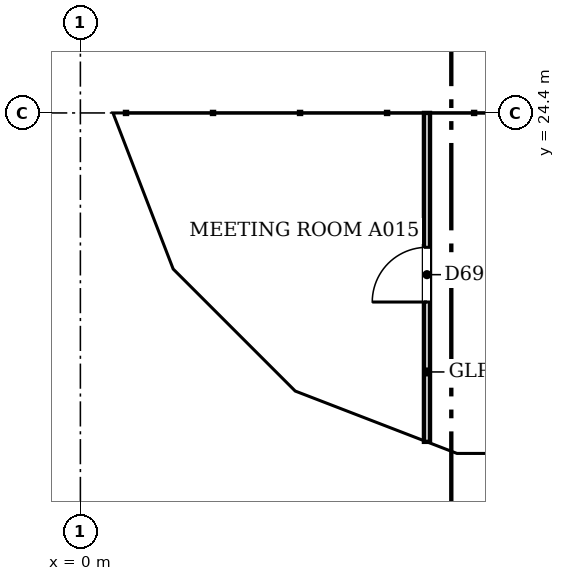
"""IFC4 building model, lengths in metres.
Left out: names, types, materials, properties, quantities, classifications, styles, units other than length and angle.
Written with IfcOpenShell. Run it as: python <this file> out.ifc"""

import sys

from ifc_helpers import new_model, si_unit, direction, frame, frame_2d, origin, place, context, subcontext, project, spatial, polyline, rectangle, outline, extrude, faceted_brep, source, transform, mapped, element, fill, save


model = new_model("IFC4")
c1 = context("Model", 3, precision=1e-05, world=origin(), true_north=direction((0.0, 1.0)))
c2 = subcontext(c1, "Body", "Model", "MODEL_VIEW")
j1 = project(units=[si_unit("LENGTHUNIT", "METRE"), si_unit("PLANEANGLEUNIT", "RADIAN")], contexts=[c1])
p1 = place(None, origin())
s1 = spatial("IfcSite", under=j1, at=p1, CompositionType="ELEMENT")
p2 = place(p1, origin())
s2 = spatial("IfcBuilding", under=s1, at=p2, CompositionType="ELEMENT")
p3 = place(p2, frame((0.0, 0.0, 216.9)))
s3 = spatial("IfcBuildingStorey", under=s2, at=p3, CompositionType="ELEMENT", Elevation=216.9)
m1 = source(origin(), c2, "Body", "Brep", [
    faceted_brep([(3.003, -0.25, 0.0), (3.05, -0.25, 0.06), (3.05, -0.25, 7.54), (3.003, -0.25, 7.6), (0.0, -0.25, 3.8), (0.0, 0.25, 3.8), (2.957, 0.25, 7.541), (2.957, 0.25, 0.059), (3.003, 0.0, 0.0), (3.003, 0.0, 7.6)], [[[0, 1, 2, 3, 4]], [[5, 6, 7]], [[1, 0, 8]], [[9, 3, 2]], [[6, 5, 4, 3, 9]], [[5, 7, 8, 0, 4]], [[1, 8, 7, 6, 9, 2]]]),
])
p4 = place(p3, frame((0.25, 27.45, -3.8), z_axis=(0.0, 0.0, 1.0), x_axis=(0.0, -1.0, 0.0)))
e1 = element("IfcWall", 1, at=p4, inside=s3, PredefinedType="SOLIDWALL", context=c2, shape_type="MappedRepresentation", body=[
    mapped(m1, transform((0.0, 0.0, 0.0), scale=1.0)),
])
m2 = source(origin(), c2, "Body", "SweptSolid", [
    extrude(outline(polyline([(2.803, 6.944), (0.319, 3.8), (2.803, 0.656), (2.803, 6.944)])), frame((0.0, 0.26, 0.0), z_axis=(0.0, -1.0, 0.0), x_axis=(1.0, 0.0, 0.0)), (0.0, 0.0, 1.0), 0.52),
])
p5 = place(p4, origin())
e2 = element("IfcOpeningElement", 2, at=p5, cuts=e1, PredefinedType="OPENING", context=c2, shape_type="MappedRepresentation", body=[
    mapped(m2, transform((0.0, 0.0, 0.0), scale=1.0)),
])
m3 = source(origin(), c2, "Body", "Brep", [
    faceted_brep([(0.047, -0.25, 0.0), (2.997, -0.25, 3.8), (0.047, -0.25, 7.6), (0.0, -0.25, 7.541), (0.0, -0.25, 0.059), (0.093, 0.25, 7.54), (2.944, 0.25, 3.868), (2.944, 0.25, 3.732), (0.093, 0.25, 0.06), (2.997, 0.0, 3.8), (0.047, 0.0, 0.0), (0.047, 0.0, 7.6)], [[[0, 1, 2, 3, 4]], [[5, 6, 7, 8]], [[8, 7, 9, 1, 0, 10]], [[6, 5, 11, 2, 1, 9]], [[3, 2, 11]], [[10, 0, 4]], [[8, 10, 4, 3, 11, 5]], [[9, 7, 6]]]),
])
p6 = place(p3, frame((0.233, 24.49, -3.8), z_axis=(0.0, 0.0, 1.0), x_axis=(0.359901446078, -0.932990326376, 0.0)))
e3 = element("IfcWall", 3, at=p6, inside=s3, PredefinedType="SOLIDWALL", context=c2, shape_type="MappedRepresentation", body=[
    mapped(m3, transform((0.0, 0.0, 0.0), scale=1.0)),
])
m4 = source(origin(), c2, "Body", "SweptSolid", [
    extrude(outline(polyline([(0.247, 0.665), (2.681, 3.8), (0.247, 6.935), (0.247, 0.665)])), frame((0.0, 0.26, 0.0), z_axis=(0.0, -1.0, 0.0), x_axis=(1.0, 0.0, 0.0)), (0.0, 0.0, 1.0), 0.52),
])
p7 = place(p6, origin())
e4 = element("IfcOpeningElement", 4, at=p7, cuts=e3, PredefinedType="OPENING", context=c2, shape_type="MappedRepresentation", body=[
    mapped(m4, transform((0.0, 0.0, 0.0), scale=1.0)),
])
m5 = source(origin(), c2, "Body", "Brep", [
    faceted_brep([(2.944, -0.25, 0.0), (2.997, -0.25, 0.068), (2.997, -0.25, 7.532), (2.944, -0.25, 7.6), (0.0, -0.25, 3.8), (0.053, 0.25, 3.868), (2.891, 0.25, 7.532), (2.891, 0.25, 0.068), (0.053, 0.25, 3.731), (2.944, 0.0, 0.0), (2.944, 0.0, 7.6), (0.0, 0.0, 3.8)], [[[0, 1, 2, 3, 4]], [[5, 6, 7, 8]], [[1, 0, 9]], [[10, 3, 2]], [[6, 5, 11, 4, 3, 10]], [[8, 7, 9, 0, 4, 11]], [[8, 11, 5]], [[1, 9, 7, 6, 10, 2]]]),
])
p8 = place(p3, frame((1.312, 21.694, -3.8), z_axis=(0.0, 0.0, 1.0), x_axis=(0.707066050402, -0.707147509625, 0.0)))
e5 = element("IfcWall", 5, at=p8, inside=s3, PredefinedType="SOLIDWALL", context=c2, shape_type="MappedRepresentation", body=[
    mapped(m5, transform((0.0, 0.0, 0.0), scale=1.0)),
])
m6 = source(origin(), c2, "Body", "SweptSolid", [
    extrude(outline(polyline([(2.744, 6.934), (0.316, 3.8), (2.744, 0.666), (2.744, 6.934)])), frame((0.0, 0.26, 0.0), z_axis=(0.0, -1.0, 0.0), x_axis=(1.0, 0.0, 0.0)), (0.0, 0.0, 1.0), 0.52),
])
p9 = place(p8, origin())
e6 = element("IfcOpeningElement", 6, at=p9, cuts=e5, PredefinedType="OPENING", context=c2, shape_type="MappedRepresentation", body=[
    mapped(m6, transform((0.0, 0.0, 0.0), scale=1.0)),
])
m7 = source(origin(), c2, "Body", "Brep", [
    faceted_brep([(0.053, -0.25, 0.0), (3.003, -0.25, 3.8), (0.053, -0.25, 7.6), (0.0, -0.25, 7.531), (0.0, -0.25, 0.068), (0.106, 0.25, 7.532), (2.957, 0.25, 3.86), (2.957, 0.25, 3.74), (0.106, 0.25, 0.068), (3.003, 0.0, 3.8), (0.053, 0.0, 0.0), (0.053, 0.0, 7.6)], [[[0, 1, 2, 3, 4]], [[5, 6, 7, 8]], [[8, 7, 9, 1, 0, 10]], [[6, 5, 11, 2, 1, 9]], [[3, 2, 11]], [[10, 0, 4]], [[8, 10, 4, 3, 11, 5]], [[9, 7, 6]]]),
])
p10 = place(p3, frame((3.344, 19.631, -3.8), z_axis=(0.0, 0.0, 1.0), x_axis=(0.933007896601, -0.359855894603, 0.0)))
e7 = element("IfcWall", 7, at=p10, inside=s3, PredefinedType="SOLIDWALL", context=c2, shape_type="MappedRepresentation", body=[
    mapped(m7, transform((0.0, 0.0, 0.0), scale=1.0)),
])
m8 = source(origin(), c2, "Body", "SweptSolid", [
    extrude(outline(polyline([(0.253, 0.665), (2.687, 3.8), (0.253, 6.935), (0.253, 0.665)])), frame((0.0, 0.26, 0.0), z_axis=(0.0, -1.0, 0.0), x_axis=(1.0, 0.0, 0.0)), (0.0, 0.0, 1.0), 0.52),
])
p11 = place(p10, origin())
e8 = element("IfcOpeningElement", 8, at=p11, cuts=e7, PredefinedType="OPENING", context=c2, shape_type="MappedRepresentation", body=[
    mapped(m8, transform((0.0, 0.0, 0.0), scale=1.0)),
])
m9 = source(origin(), c2, "Body", "Brep", [
    faceted_brep([(3.003, -0.25, 0.0), (6.053, -0.25, 3.8), (3.003, -0.25, 7.6), (0.0, -0.25, 3.8), (0.047, 0.25, 3.859), (3.003, 0.25, 7.6), (6.053, 0.25, 3.8), (3.003, 0.25, 0.0), (0.047, 0.25, 3.741), (0.0, 0.0, 3.8)], [[[0, 1, 2, 3]], [[4, 5, 6, 7, 8]], [[7, 6, 1, 0]], [[6, 5, 2, 1]], [[5, 4, 9, 3, 2]], [[8, 7, 0, 3, 9]], [[8, 9, 4]]]),
])
p12 = place(p3, frame((6.146, 18.55, -3.8), z_axis=(0.0, 0.0, 1.0), x_axis=(1.0, 0.0, 0.0)))
e9 = element("IfcWall", 9, at=p12, inside=s3, PredefinedType="SOLIDWALL", context=c2, shape_type="MappedRepresentation", body=[
    mapped(m9, transform((0.0, 0.0, 0.0), scale=1.0)),
])
m10 = source(origin(), c2, "Body", "SweptSolid", [
    extrude(outline(polyline([(3.005, 0.401), (5.733, 3.8), (3.005, 7.199), (0.319, 3.8), (3.005, 0.401)])), frame((0.0, 0.26, 0.0), z_axis=(0.0, -1.0, 0.0), x_axis=(1.0, 0.0, 0.0)), (0.0, 0.0, 1.0), 0.52),
])
p13 = place(p12, origin())
e10 = element("IfcOpeningElement", 10, at=p13, cuts=e9, PredefinedType="OPENING", context=c2, shape_type="MappedRepresentation", body=[
    mapped(m10, transform((0.0, 0.0, 0.0), scale=1.0)),
])
p14 = place(p2, frame((0.0, 0.0, 220.7)))
s4 = spatial("IfcBuildingStorey", under=s2, at=p14, CompositionType="ELEMENT", Elevation=220.7)
m11 = source(origin(), c2, "Body", "Brep", [
    faceted_brep([(3.05, -0.25, 0.0), (6.053, -0.25, 3.8), (3.05, -0.25, 7.6), (0.0, -0.25, 3.8), (0.0, 0.25, 3.8), (3.05, 0.25, 7.6), (6.007, 0.25, 3.859), (6.007, 0.25, 3.741), (3.05, 0.25, 0.0), (6.053, 0.0, 3.8)], [[[0, 1, 2, 3]], [[4, 5, 6, 7, 8]], [[8, 7, 9, 1, 0]], [[6, 5, 2, 1, 9]], [[5, 4, 3, 2]], [[4, 8, 0, 3]], [[9, 7, 6]]]),
])
p15 = place(p14, frame((0.25, 30.5, -3.8), z_axis=(0.0, 0.0, 1.0), x_axis=(0.0, -1.0, 0.0)))
e11 = element("IfcWall", 11, at=p15, inside=s4, PredefinedType="SOLIDWALL", context=c2, shape_type="MappedRepresentation", body=[
    mapped(m11, transform((0.0, 0.0, 0.0), scale=1.0)),
])
m12 = source(origin(), c2, "Body", "SweptSolid", [
    extrude(outline(polyline([(3.049, 0.401), (5.735, 3.8), (3.049, 7.199), (0.321, 3.8), (3.049, 0.401)])), frame((0.0, 0.26, 0.0), z_axis=(0.0, -1.0, 0.0), x_axis=(1.0, 0.0, 0.0)), (0.0, 0.0, 1.0), 0.52),
])
p16 = place(p15, origin())
e12 = element("IfcOpeningElement", 12, at=p16, cuts=e11, PredefinedType="OPENING", context=c2, shape_type="MappedRepresentation", body=[
    mapped(m12, transform((0.0, 0.0, 0.0), scale=1.0)),
])
m13 = source(origin(), c2, "Body", "Brep", [
    faceted_brep([(2.95, -0.25, 0.0), (3.003, -0.25, 0.068), (3.003, -0.25, 7.532), (2.95, -0.25, 7.6), (0.0, -0.25, 3.8), (0.047, 0.25, 3.86), (2.898, 0.25, 7.532), (2.898, 0.25, 0.068), (0.047, 0.25, 3.74), (2.95, 0.0, 0.0), (2.95, 0.0, 7.6), (0.0, 0.0, 3.8)], [[[0, 1, 2, 3, 4]], [[5, 6, 7, 8]], [[1, 0, 9]], [[10, 3, 2]], [[6, 5, 11, 4, 3, 10]], [[8, 7, 9, 0, 4, 11]], [[8, 11, 5]], [[1, 9, 7, 6, 10, 2]]]),
])
p17 = place(p14, frame((0.25, 24.447, -3.8), z_axis=(0.0, 0.0, 1.0), x_axis=(0.35992665181, -0.932980602862, 0.0)))
e13 = element("IfcWall", 13, at=p17, inside=s4, PredefinedType="SOLIDWALL", context=c2, shape_type="MappedRepresentation", body=[
    mapped(m13, transform((0.0, 0.0, 0.0), scale=1.0)),
])
m14 = source(origin(), c2, "Body", "SweptSolid", [
    extrude(outline(polyline([(2.75, 6.935), (0.316, 3.8), (2.75, 0.665), (2.75, 6.935)])), frame((0.0, 0.26, 0.0), z_axis=(0.0, -1.0, 0.0), x_axis=(1.0, 0.0, 0.0)), (0.0, 0.0, 1.0), 0.52),
])
p18 = place(p17, origin())
e14 = element("IfcOpeningElement", 14, at=p18, cuts=e13, PredefinedType="OPENING", context=c2, shape_type="MappedRepresentation", body=[
    mapped(m14, transform((0.0, 0.0, 0.0), scale=1.0)),
])
m15 = source(origin(), c2, "Body", "Brep", [
    faceted_brep([(0.053, -0.25, 0.0), (2.997, -0.25, 3.8), (0.053, -0.25, 7.6), (0.0, -0.25, 7.532), (0.0, -0.25, 0.068), (0.106, 0.25, 7.532), (2.944, 0.25, 3.868), (2.944, 0.25, 3.732), (0.106, 0.25, 0.068), (2.997, 0.0, 3.8), (0.053, 0.0, 0.0), (0.053, 0.0, 7.6)], [[[0, 1, 2, 3, 4]], [[5, 6, 7, 8]], [[8, 7, 9, 1, 0, 10]], [[6, 5, 11, 2, 1, 9]], [[3, 2, 11]], [[10, 0, 4]], [[8, 10, 4, 3, 11, 5]], [[9, 7, 6]]]),
])
p19 = place(p14, frame((1.274, 21.731, -3.8), z_axis=(0.0, 0.0, 1.0), x_axis=(0.707147509625, -0.707066050402, 0.0)))
e15 = element("IfcWall", 15, at=p19, inside=s4, PredefinedType="SOLIDWALL", context=c2, shape_type="MappedRepresentation", body=[
    mapped(m15, transform((0.0, 0.0, 0.0), scale=1.0)),
])
m16 = source(origin(), c2, "Body", "SweptSolid", [
    extrude(outline(polyline([(0.253, 0.667), (2.681, 3.8), (0.253, 6.934), (0.253, 0.667)])), frame((0.0, 0.26, 0.0), z_axis=(0.0, -1.0, 0.0), x_axis=(1.0, 0.0, 0.0)), (0.0, 0.0, 1.0), 0.52),
])
p20 = place(p19, origin())
e16 = element("IfcOpeningElement", 16, at=p20, cuts=e15, PredefinedType="OPENING", context=c2, shape_type="MappedRepresentation", body=[
    mapped(m16, transform((0.0, 0.0, 0.0), scale=1.0)),
])
m17 = source(origin(), c2, "Body", "Brep", [
    faceted_brep([(2.95, -0.25, 0.0), (2.997, -0.25, 0.059), (2.997, -0.25, 7.541), (2.95, -0.25, 7.6), (0.0, -0.25, 3.8), (0.053, 0.25, 3.868), (2.904, 0.25, 7.54), (2.904, 0.25, 0.06), (0.053, 0.25, 3.732), (2.95, 0.0, 0.0), (2.95, 0.0, 7.6), (0.0, 0.0, 3.8)], [[[0, 1, 2, 3, 4]], [[5, 6, 7, 8]], [[1, 0, 9]], [[10, 3, 2]], [[6, 5, 11, 4, 3, 10]], [[8, 7, 9, 0, 4, 11]], [[8, 11, 5]], [[1, 9, 7, 6, 10, 2]]]),
])
p21 = place(p14, frame((3.394, 19.612, -3.8), z_axis=(0.0, 0.0, 1.0), x_axis=(0.932990326376, -0.359901446078, 0.0)))
e17 = element("IfcWall", 17, at=p21, inside=s4, PredefinedType="SOLIDWALL", context=c2, shape_type="MappedRepresentation", body=[
    mapped(m17, transform((0.0, 0.0, 0.0), scale=1.0)),
])
p22 = place(p21, origin())
e18 = element("IfcOpeningElement", 18, at=p22, cuts=e17, PredefinedType="OPENING", context=c2, shape_type="MappedRepresentation", body=[
    mapped(m14, transform((0.0, 0.0, 0.0), scale=1.0)),
])
m18 = source(origin(), c2, "Body", "Brep", [
    faceted_brep([(0.047, -0.25, 0.0), (3.05, -0.25, 3.8), (0.047, -0.25, 7.6), (0.0, -0.25, 7.54), (0.0, -0.25, 0.06), (0.093, 0.25, 7.541), (3.05, 0.25, 3.8), (0.093, 0.25, 0.059), (0.047, 0.0, 0.0), (0.047, 0.0, 7.6)], [[[0, 1, 2, 3, 4]], [[5, 6, 7]], [[7, 6, 1, 0, 8]], [[6, 5, 9, 2, 1]], [[3, 2, 9]], [[8, 0, 4]], [[7, 8, 4, 3, 9, 5]]]),
])
p23 = place(p14, frame((6.1, 18.55, -3.8), z_axis=(0.0, 0.0, 1.0), x_axis=(1.0, 0.0, 0.0)))
e19 = element("IfcWall", 19, at=p23, inside=s4, PredefinedType="SOLIDWALL", context=c2, shape_type="MappedRepresentation", body=[
    mapped(m18, transform((0.0, 0.0, 0.0), scale=1.0)),
])
m19 = source(origin(), c2, "Body", "SweptSolid", [
    extrude(outline(polyline([(0.247, 0.656), (2.731, 3.8), (0.247, 6.944), (0.247, 0.656)])), frame((0.0, 0.26, 0.0), z_axis=(0.0, -1.0, 0.0), x_axis=(1.0, 0.0, 0.0)), (0.0, 0.0, 1.0), 0.52),
])
p24 = place(p23, origin())
e20 = element("IfcOpeningElement", 20, at=p24, cuts=e19, PredefinedType="OPENING", context=c2, shape_type="MappedRepresentation", body=[
    mapped(m19, transform((0.0, 0.0, 0.0), scale=1.0)),
])
p25 = place(p3, frame((5.7, 18.99, 0.0), z_axis=(0.0, 0.0, 1.0), x_axis=(0.0, 1.0, 0.0)))
e21 = element("IfcWall", 21, at=p25, inside=s3, PredefinedType="PARTITIONING", context=c2, shape_type="SweptSolid", body=[
    extrude(rectangle(XDim=5.41, YDim=0.1, at=frame_2d((2.705, 0.0))), origin(), (0.0, 0.0, 1.0), 3.067),
])
m20 = source(origin(), c2, "Body", "SweptSolid", [
    extrude(rectangle(XDim=0.9, YDim=2.1, at=frame_2d((0.45, 1.05))), frame((0.0, 0.06, 0.0), z_axis=(0.0, -1.0, 0.0), x_axis=(1.0, 0.0, 0.0)), (0.0, 0.0, 1.0), 0.12),
])
p26 = place(p25, frame((2.3, 0.0, 0.0)))
e22 = element("IfcOpeningElement", 22, at=p26, cuts=e21, PredefinedType="OPENING", context=c2, shape_type="MappedRepresentation", body=[
    mapped(m20, transform((0.0, 0.0, 0.0), scale=1.0)),
])
m21 = source(origin(), c2, "Body", "SweptSolid", [
    extrude(rectangle(XDim=0.9, YDim=2.1, at=frame_2d((0.45, 1.05))), frame((0.0, 0.025, 0.0), z_axis=(0.0, -1.0, 0.0), x_axis=(1.0, 0.0, 0.0)), (0.0, 0.0, 1.0), 0.05),
])
p27 = place(p26, origin())
e23 = element("IfcDoor", 23, at=p27, inside=s3, OperationType="SINGLE_SWING_LEFT", PredefinedType="DOOR", context=c2, shape_type="MappedRepresentation", body=[
    mapped(m21, transform((0.0, 0.0, 0.0), scale=1.0)),
])
fill(e22, e23)
save(model, sys.argv[1])
